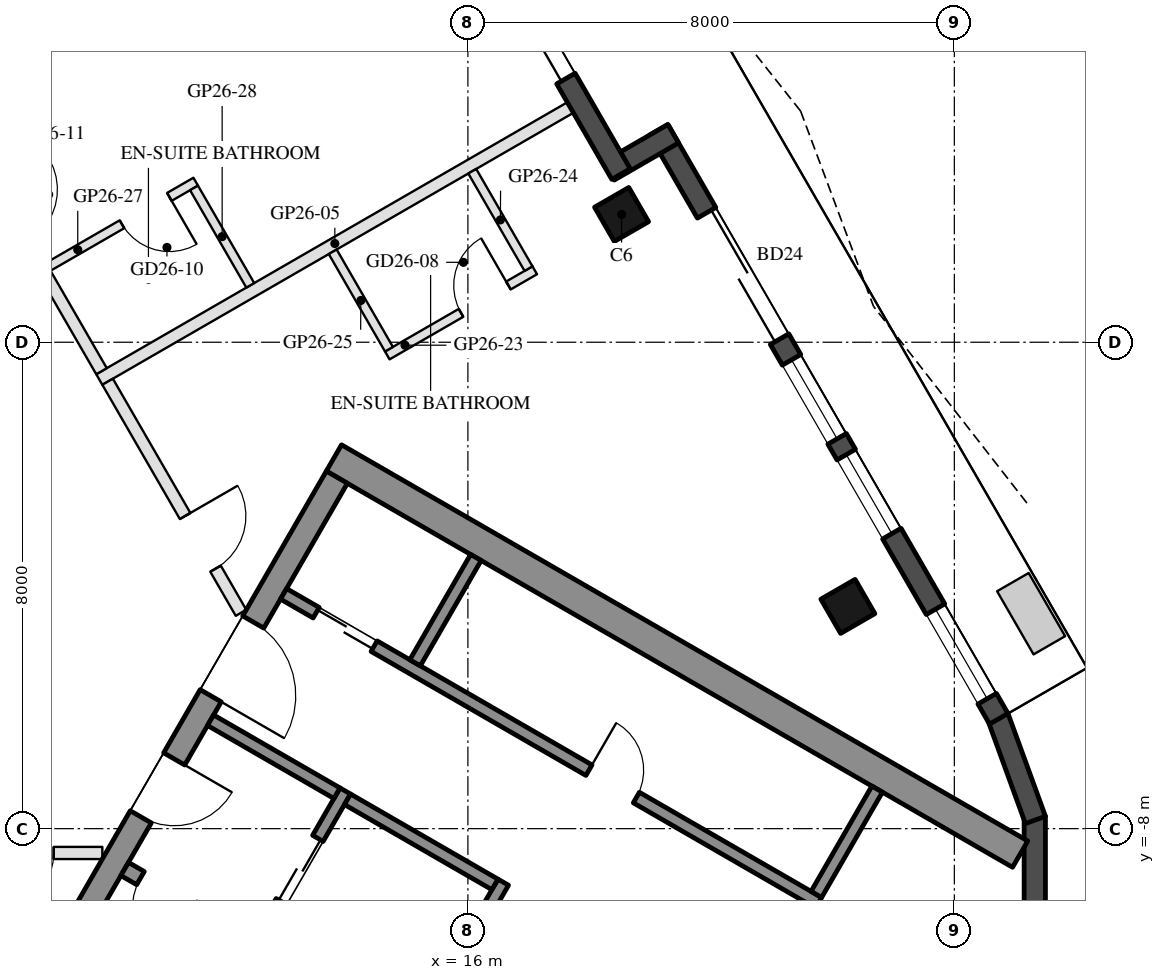
"""IFC4 building model, lengths in metres.
Left out: names, types, materials, properties, quantities, classifications, styles, units other than length and angle.
Written with IfcOpenShell. Run it as: python <this file> out.ifc"""

import sys

from ifc_helpers import new_model, si_unit, direction, frame, frame_2d, origin, origin_2d, place, context, subcontext, project, spatial, rectangle, hollow_rectangle, extrude, boolean, halfspace, element, fill, save


model = new_model("IFC4")
c1 = context("Model", 3, precision=1e-05, world=origin(), true_north=direction((0.0, 1.0)))
c2 = subcontext(c1, "Body", "Model", "MODEL_VIEW")
j1 = project(units=[si_unit("LENGTHUNIT", "METRE"), si_unit("PLANEANGLEUNIT", "RADIAN")], contexts=[c1])
p1 = place(None, origin())
s1 = spatial("IfcSite", under=j1, at=p1, CompositionType="ELEMENT")
p2 = place(p1, origin())
s2 = spatial("IfcBuilding", under=s1, at=p2, CompositionType="ELEMENT")
p3 = place(p2, frame((0.0, 0.0, 268.9)))
s3 = spatial("IfcBuildingStorey", under=s2, at=p3, CompositionType="ELEMENT", Elevation=268.9)
p4 = place(p3, frame((22.249, -4.345, 0.0), z_axis=(0.0, 0.0, 1.0), x_axis=(-0.5, 0.866025403784, 0.0)))
e1 = element("IfcColumn", 1, at=p4, inside=s3, PredefinedType="COLUMN", context=c2, shape_type="SweptSolid", body=[
    boolean("DIFFERENCE", extrude(hollow_rectangle(XDim=0.65, YDim=0.65, WallThickness=0.03, at=origin_2d()), origin(), (0.0, 0.0, 1.0), 3.7), halfspace(frame((0.0, 0.0, 0.047), z_axis=(0.0, 0.0, 1.0), x_axis=(1.0, 0.0, 0.0)), True)),
])
p5 = place(p3, frame((18.527, 2.102, 0.0), z_axis=(0.0, 0.0, 1.0), x_axis=(-0.5, 0.866025403784, 0.0)))
e2 = element("IfcColumn", 2, at=p5, inside=s3, PredefinedType="COLUMN", context=c2, shape_type="SweptSolid", body=[
    boolean("DIFFERENCE", extrude(hollow_rectangle(XDim=0.65, YDim=0.65, WallThickness=0.03, at=origin_2d()), origin(), (0.0, 0.0, 1.0), 3.7), halfspace(frame((0.0, 0.0, 0.04), z_axis=(0.0, 0.0, 1.0), x_axis=(1.0, 0.0, 0.0)), True)),
])
p6 = place(p3, frame((25.323, -9.597, 0.0), z_axis=(0.0, 0.0, 1.0), x_axis=(0.0, 1.0, 0.0)))
e3 = element("IfcWall", 3, at=p6, inside=s3, PredefinedType="SOLIDWALL", context=c2, shape_type="SweptSolid", body=[
    extrude(rectangle(XDim=1.8, YDim=0.35, at=frame_2d((0.9, 0.0))), origin(), (0.0, 0.0, 1.0), 3.55),
])
p7 = place(p3, frame((25.333, -7.857, 0.0), z_axis=(0.0, 0.0, 1.0), x_axis=(-0.34206975284, 0.939674562916, 0.0)))
e4 = element("IfcWall", 4, at=p7, inside=s3, PredefinedType="SOLIDWALL", context=c2, shape_type="SweptSolid", body=[
    extrude(rectangle(XDim=1.8, YDim=0.35, at=frame_2d((0.9, 0.0))), origin(), (0.0, 0.0, 1.0), 3.55),
])
p8 = place(p3, frame((24.731, -6.193, 0.0), z_axis=(0.0, 0.0, 1.0), x_axis=(-0.500007749075, 0.866020929808, 0.0)))
e5 = element("IfcWall", 5, at=p8, inside=s3, PredefinedType="SOLIDWALL", context=c2, shape_type="SweptSolid", body=[
    extrude(rectangle(XDim=11.185, YDim=0.35, at=frame_2d((5.593, 0.0))), origin(), (0.0, 0.0, 1.0), 3.55),
])
p9 = place(p8, frame((0.381, 0.0, 0.3)))
e6 = element("IfcOpeningElement", 6, at=p9, cuts=e5, PredefinedType="OPENING", context=c2, shape_type="SweptSolid", body=[
    extrude(rectangle(XDim=1.7, YDim=2.65, at=frame_2d((0.85, 1.325))), frame((0.0, 0.185, 0.0), z_axis=(0.0, -1.0, 0.0), x_axis=(1.0, 0.0, 0.0)), (0.0, 0.0, 1.0), 0.37),
])
p10 = place(p8, frame((7.21, 0.0, 0.0)))
e7 = element("IfcOpeningElement", 7, at=p10, cuts=e5, PredefinedType="OPENING", context=c2, shape_type="SweptSolid", body=[
    extrude(rectangle(XDim=2.4, YDim=2.4, at=frame_2d((1.2, 1.2))), frame((0.0, 0.185, 0.0), z_axis=(0.0, -1.0, 0.0), x_axis=(1.0, 0.0, 0.0)), (0.0, 0.0, 1.0), 0.37),
])
p11 = place(p8, frame((3.517, 0.0, 0.3)))
e8 = element("IfcOpeningElement", 8, at=p11, cuts=e5, PredefinedType="OPENING", context=c2, shape_type="SweptSolid", body=[
    extrude(rectangle(XDim=1.5, YDim=2.65, at=frame_2d((0.75, 1.325))), frame((0.0, 0.185, 0.0), z_axis=(0.0, -1.0, 0.0), x_axis=(1.0, 0.0, 0.0)), (0.0, 0.0, 1.0), 0.37),
])
p12 = place(p8, frame((5.317, 0.0, 0.3)))
e9 = element("IfcOpeningElement", 9, at=p12, cuts=e5, PredefinedType="OPENING", context=c2, shape_type="SweptSolid", body=[
    extrude(rectangle(XDim=1.5, YDim=2.65, at=frame_2d((0.75, 1.325))), frame((0.0, 0.185, 0.0), z_axis=(0.0, -1.0, 0.0), x_axis=(1.0, 0.0, 0.0)), (0.0, 0.0, 1.0), 0.37),
])
p13 = place(p3, frame((19.377, 3.429, 0.0), z_axis=(0.0, 0.0, 1.0), x_axis=(-0.866092288191, -0.499884134912, 0.0)))
e10 = element("IfcWall", 10, at=p13, inside=s3, PredefinedType="SOLIDWALL", context=c2, shape_type="SweptSolid", body=[
    extrude(rectangle(XDim=1.22, YDim=0.35, at=frame_2d((0.61, 0.0))), origin(), (0.0, 0.0, 1.0), 3.55),
])
p14 = place(p3, frame((18.519, 2.766, 0.0), z_axis=(0.0, 0.0, 1.0), x_axis=(-0.499995993298, 0.866027717042, 0.0)))
e11 = element("IfcWall", 11, at=p14, inside=s3, PredefinedType="SOLIDWALL", context=c2, shape_type="SweptSolid", body=[
    extrude(rectangle(XDim=6.284, YDim=0.35, at=frame_2d((3.142, 0.0))), origin(), (0.0, 0.0, 1.0), 3.55),
])
p15 = place(p14, frame((1.813, 0.0, 0.0)))
e12 = element("IfcOpeningElement", 12, at=p15, cuts=e11, PredefinedType="OPENING", context=c2, shape_type="SweptSolid", body=[
    extrude(rectangle(XDim=2.4, YDim=2.4, at=frame_2d((1.2, 1.2))), frame((0.0, 0.185, 0.0), z_axis=(0.0, -1.0, 0.0), x_axis=(1.0, 0.0, 0.0)), (0.0, 0.0, 1.0), 0.37),
])
p16 = place(p14, frame((4.513, 0.0, 0.3)))
e13 = element("IfcOpeningElement", 13, at=p16, cuts=e11, PredefinedType="OPENING", context=c2, shape_type="SweptSolid", body=[
    extrude(rectangle(XDim=1.4, YDim=2.65, at=frame_2d((0.7, 1.325))), frame((0.0, 0.185, 0.0), z_axis=(0.0, -1.0, 0.0), x_axis=(1.0, 0.0, 0.0)), (0.0, 0.0, 1.0), 0.37),
])
p17 = place(p3, frame((13.797, -1.903, 0.0), z_axis=(0.0, 0.0, 1.0), x_axis=(0.866022106474, -0.500005711065, 0.0)))
e14 = element("IfcWall", 14, at=p17, inside=s3, PredefinedType="SHEAR", context=c2, shape_type="SweptSolid", body=[
    extrude(rectangle(XDim=13.031, YDim=0.5, at=frame_2d((6.516, 0.0))), origin(), (0.0, 0.0, 1.0), 3.5),
])
p18 = place(p3, frame((8.845, -10.88, 0.0), z_axis=(0.0, 0.0, 1.0), x_axis=(0.500004234368, 0.866022959057, 0.0)))
e15 = element("IfcWall", 15, at=p18, inside=s3, PredefinedType="SHEAR", context=c2, shape_type="SweptSolid", body=[
    extrude(rectangle(XDim=10.0, YDim=0.4, at=frame_2d((5.0, 0.0))), origin(), (0.0, 0.0, 1.0), 3.5),
])
p19 = place(p18, frame((3.55, 0.0, 0.0)))
e16 = element("IfcOpeningElement", 16, at=p19, cuts=e15, PredefinedType="OPENING", context=c2, shape_type="SweptSolid", body=[
    extrude(rectangle(XDim=1.1, YDim=2.1, at=frame_2d((0.55, 1.05))), frame((0.0, 0.21, 0.0), z_axis=(0.0, -1.0, 0.0), x_axis=(1.0, 0.0, 0.0)), (0.0, 0.0, 1.0), 0.42),
])
p20 = place(p18, frame((5.85, 0.0, 0.0)))
e17 = element("IfcOpeningElement", 17, at=p20, cuts=e15, PredefinedType="OPENING", context=c2, shape_type="SweptSolid", body=[
    extrude(rectangle(XDim=1.4, YDim=2.1, at=frame_2d((0.7, 1.05))), frame((0.0, 0.21, 0.0), z_axis=(0.0, -1.0, 0.0), x_axis=(1.0, 0.0, 0.0)), (0.0, 0.0, 1.0), 0.42),
])
p21 = place(p3, frame((10.356, -8.664, 0.0), z_axis=(0.0, 0.0, 1.0), x_axis=(0.866028629588, -0.499994412703, 0.0)))
e18 = element("IfcWall", 18, at=p21, inside=s3, PredefinedType="SHEAR", context=c2, shape_type="SweptSolid", body=[
    extrude(rectangle(XDim=6.45, YDim=0.25, at=frame_2d((3.225, 0.0))), origin(), (0.0, 0.0, 1.0), 3.5),
])
p22 = place(p21, frame((0.3, 0.0, 0.0)))
e19 = element("IfcOpeningElement", 19, at=p22, cuts=e18, PredefinedType="OPENING", context=c2, shape_type="SweptSolid", body=[
    extrude(rectangle(XDim=1.0, YDim=2.1, at=frame_2d((0.5, 1.05))), frame((0.0, 0.135, 0.0), z_axis=(0.0, -1.0, 0.0), x_axis=(1.0, 0.0, 0.0)), (0.0, 0.0, 1.0), 0.27),
])
p23 = place(p3, frame((15.181, -11.305, 0.0), z_axis=(0.0, 0.0, 1.0), x_axis=(0.49994636267, 0.866056369097, 0.0)))
e20 = element("IfcWall", 20, at=p23, inside=s3, PredefinedType="SHEAR", context=c2, shape_type="SweptSolid", body=[
    extrude(rectangle(XDim=2.8, YDim=0.2, at=frame_2d((1.4, 0.0))), origin(), (0.0, 0.0, 1.0), 3.5),
])
p24 = place(p3, frame((12.583, -9.805, 0.0), z_axis=(0.0, 0.0, 1.0), x_axis=(0.49994636267, 0.866056369097, 0.0)))
e21 = element("IfcWall", 21, at=p24, inside=s3, PredefinedType="SHEAR", context=c2, shape_type="SweptSolid", body=[
    extrude(rectangle(XDim=2.8, YDim=0.2, at=frame_2d((1.4, 0.0))), origin(), (0.0, 0.0, 1.0), 3.5),
])
p25 = place(p24, frame((0.7, 0.0, 0.0)))
e22 = element("IfcOpeningElement", 22, at=p25, cuts=e21, PredefinedType="OPENING", context=c2, shape_type="SweptSolid", body=[
    extrude(rectangle(XDim=1.2, YDim=2.1, at=frame_2d((0.6, 1.05))), frame((0.0, 0.11, 0.0), z_axis=(0.0, -1.0, 0.0), x_axis=(1.0, 0.0, 0.0)), (0.0, 0.0, 1.0), 0.22),
])
p26 = place(p3, frame((11.768, -6.217, 0.0), z_axis=(0.0, 0.0, 1.0), x_axis=(0.866050077142, -0.499957262057, 0.0)))
e23 = element("IfcWall", 23, at=p26, inside=s3, PredefinedType="SHEAR", context=c2, shape_type="SweptSolid", body=[
    extrude(rectangle(XDim=2.4, YDim=0.2, at=frame_2d((1.2, 0.0))), origin(), (0.0, 0.0, 1.0), 3.5),
])
p27 = place(p3, frame((14.02, -7.517, 0.0), z_axis=(0.0, 0.0, 1.0), x_axis=(0.866034573852, -0.49998411664, 0.0)))
e24 = element("IfcWall", 24, at=p27, inside=s3, PredefinedType="SHEAR", context=c2, shape_type="SweptSolid", body=[
    extrude(rectangle(XDim=2.8, YDim=0.2, at=frame_2d((1.4, 0.0))), origin(), (0.0, 0.0, 1.0), 3.5),
])
p28 = place(p3, frame((12.968, -4.138, 0.0), z_axis=(0.0, 0.0, 1.0), x_axis=(0.866028328073, -0.49999493495, 0.0)))
e25 = element("IfcWall", 25, at=p28, inside=s3, PredefinedType="SHEAR", context=c2, shape_type="SweptSolid", body=[
    extrude(rectangle(XDim=10.16, YDim=0.2, at=frame_2d((5.08, 0.0))), origin(), (0.0, 0.0, 1.0), 3.5),
])
p29 = place(p28, frame((0.62, 0.0, 0.0)))
e26 = element("IfcOpeningElement", 26, at=p29, cuts=e25, PredefinedType="OPENING", context=c2, shape_type="SweptSolid", body=[
    extrude(rectangle(XDim=1.1, YDim=2.1, at=frame_2d((0.55, 1.05))), frame((0.0, 0.11, 0.0), z_axis=(0.0, -1.0, 0.0), x_axis=(1.0, 0.0, 0.0)), (0.0, 0.0, 1.0), 0.22),
])
p30 = place(p28, frame((5.8, 0.0, 0.0)))
e27 = element("IfcOpeningElement", 27, at=p30, cuts=e25, PredefinedType="OPENING", context=c2, shape_type="SweptSolid", body=[
    extrude(rectangle(XDim=0.9, YDim=2.1, at=frame_2d((0.45, 1.05))), frame((0.0, 0.11, 0.0), z_axis=(0.0, -1.0, 0.0), x_axis=(1.0, 0.0, 0.0)), (0.0, 0.0, 1.0), 0.22),
])
for number, where, z_axis, x_axis in (
    (28, (15.131, -5.272, 0.0), (0.0, 0.0, 1.0), (0.5, 0.866, 0.0)),
    (29, (21.73, -9.082, 0.0), (0.0, 0.0, 1.0), (0.5, 0.866, 0.0)),
):
    element("IfcWall", number, at=place(p3, frame(where, z_axis=z_axis, x_axis=x_axis)), inside=s3, PredefinedType="SHEAR", context=c2, shape_type="SweptSolid", body=[
        extrude(rectangle(XDim=2.0, YDim=0.2, at=frame_2d((1.0, 0.0))), origin(), (0.0, 0.0, 1.0), 3.5),
    ])
p31 = place(p3, frame((17.685, 3.86, 0.0), z_axis=(0.0, 0.0, 1.0), x_axis=(-0.866026066645, -0.499998851889, 0.0)))
e30 = element("IfcWall", 30, at=p31, inside=s3, PredefinedType="PARTITIONING", context=c2, shape_type="SweptSolid", body=[
    extrude(rectangle(XDim=8.946, YDim=0.2, at=frame_2d((4.473, 0.0))), origin(), (0.0, 0.0, 1.0), 3.16),
])
p32 = place(p3, frame((9.988, -8.4, 0.0), z_axis=(0.0, 0.0, 1.0), x_axis=(-1.0, 0.0, 0.0)))
e31 = element("IfcWall", 31, at=p32, inside=s3, PredefinedType="PARTITIONING", context=c2, shape_type="SweptSolid", body=[
    extrude(rectangle(XDim=3.788, YDim=0.2, at=frame_2d((1.894, 0.0))), origin(), (0.0, 0.0, 1.0), 3.0),
])
p33 = place(p32, frame((0.8, 0.0, 0.0)))
e32 = element("IfcOpeningElement", 32, at=p33, cuts=e31, PredefinedType="OPENING", context=c2, shape_type="SweptSolid", body=[
    extrude(rectangle(XDim=1.0, YDim=2.1, at=frame_2d((0.5, 1.05))), frame((0.0, 0.11, 0.0), z_axis=(0.0, -1.0, 0.0), x_axis=(1.0, 0.0, 0.0)), (0.0, 0.0, 1.0), 0.22),
])
p34 = place(p3, frame((10.075, -0.65, 0.0), z_axis=(0.0, 0.0, 1.0), x_axis=(0.499998569178, -0.866026229868, 0.0)))
e33 = element("IfcWall", 33, at=p34, inside=s3, PredefinedType="PARTITIONING", context=c2, shape_type="SweptSolid", body=[
    extrude(rectangle(XDim=4.388, YDim=0.2, at=frame_2d((2.194, 0.0))), origin(), (0.0, 0.0, 1.0), 3.0),
])
p35 = place(p34, frame((2.55, 0.0, 0.0)))
e34 = element("IfcOpeningElement", 34, at=p35, cuts=e33, PredefinedType="OPENING", context=c2, shape_type="SweptSolid", body=[
    extrude(rectangle(XDim=1.0, YDim=2.1, at=frame_2d((0.5, 1.05))), frame((0.0, 0.11, 0.0), z_axis=(0.0, -1.0, 0.0), x_axis=(1.0, 0.0, 0.0)), (0.0, 0.0, 1.0), 0.22),
])
p36 = place(p3, frame((14.674, -0.217, 0.0), z_axis=(0.0, 0.0, 1.0), x_axis=(0.866056369097, 0.49994636267, 0.0)))
e35 = element("IfcWall", 35, at=p36, inside=s3, PredefinedType="PARTITIONING", context=c2, shape_type="SweptSolid", body=[
    extrude(rectangle(XDim=2.8, YDim=0.15, at=frame_2d((1.4, 0.0))), origin(), (0.0, 0.0, 1.0), 3.0),
])
p37 = place(p36, frame((1.4, 0.0, 0.0)))
e36 = element("IfcOpeningElement", 36, at=p37, cuts=e35, PredefinedType="OPENING", context=c2, shape_type="SweptSolid", body=[
    extrude(rectangle(XDim=0.9, YDim=2.1, at=frame_2d((0.45, 1.05))), frame((0.0, 0.085, 0.0), z_axis=(0.0, -1.0, 0.0), x_axis=(1.0, 0.0, 0.0)), (0.0, 0.0, 1.0), 0.17),
])
p38 = place(p3, frame((16.997, 1.211, 0.0), z_axis=(0.0, 0.0, 1.0), x_axis=(-0.500042316284, 0.866000971088, 0.0)))
e37 = element("IfcWall", 37, at=p38, inside=s3, PredefinedType="PARTITIONING", context=c2, shape_type="SweptSolid", body=[
    extrude(rectangle(XDim=1.85, YDim=0.15, at=frame_2d((0.925, 0.0))), origin(), (0.0, 0.0, 1.0), 3.0),
])
p39 = place(p3, frame((14.702, -0.115, 0.0), z_axis=(0.0, 0.0, 1.0), x_axis=(-0.499985172903, 0.866033964044, 0.0)))
e38 = element("IfcWall", 38, at=p39, inside=s3, PredefinedType="PARTITIONING", context=c2, shape_type="SweptSolid", body=[
    extrude(rectangle(XDim=1.85, YDim=0.15, at=frame_2d((0.925, 0.0))), origin(), (0.0, 0.0, 1.0), 3.0),
])
p40 = place(p3, frame((6.476, 5.583, 0.0), z_axis=(0.0, 0.0, 1.0), x_axis=(0.499989243959, -0.866031613699, 0.0)))
e39 = element("IfcWall", 39, at=p40, inside=s3, PredefinedType="PARTITIONING", context=c2, shape_type="SweptSolid", body=[
    extrude(rectangle(XDim=6.997, YDim=0.2, at=frame_2d((3.499, 0.0))), origin(), (0.0, 0.0, 1.0), 3.0),
])
p41 = place(p40, frame((3.547, 0.0, 0.0)))
e40 = element("IfcOpeningElement", 40, at=p41, cuts=e39, PredefinedType="OPENING", context=c2, shape_type="SweptSolid", body=[
    extrude(rectangle(XDim=1.0, YDim=2.1, at=frame_2d((0.5, 1.05))), frame((0.0, 0.11, 0.0), z_axis=(0.0, -1.0, 0.0), x_axis=(1.0, 0.0, 0.0)), (0.0, 0.0, 1.0), 0.22),
])
p42 = place(p3, frame((11.524, 2.641, 0.0), z_axis=(0.0, 0.0, 1.0), x_axis=(-0.866018616679, -0.500011755427, 0.0)))
e41 = element("IfcWall", 41, at=p42, inside=s3, PredefinedType="PARTITIONING", context=c2, shape_type="SweptSolid", body=[
    extrude(rectangle(XDim=2.8, YDim=0.15, at=frame_2d((1.4, 0.0))), origin(), (0.0, 0.0, 1.0), 3.55),
])
p43 = place(p42, frame((0.5, 0.0, 0.0)))
e42 = element("IfcOpeningElement", 42, at=p43, cuts=e41, PredefinedType="OPENING", context=c2, shape_type="SweptSolid", body=[
    extrude(rectangle(XDim=0.9, YDim=2.1, at=frame_2d((0.45, 1.05))), frame((0.0, 0.085, 0.0), z_axis=(0.0, -1.0, 0.0), x_axis=(1.0, 0.0, 0.0)), (0.0, 0.0, 1.0), 0.17),
])
p44 = place(p3, frame((12.421, 0.936, 0.0), z_axis=(0.0, 0.0, 1.0), x_axis=(-0.500042316284, 0.866000971088, 0.0)))
e43 = element("IfcWall", 43, at=p44, inside=s3, PredefinedType="PARTITIONING", context=c2, shape_type="SweptSolid", body=[
    extrude(rectangle(XDim=1.85, YDim=0.15, at=frame_2d((0.925, 0.0))), origin(), (0.0, 0.0, 1.0), 3.0),
])
p45 = place(p9, origin())
e44 = element("IfcWindow", 44, at=p45, inside=s3, PartitioningType="SINGLE_PANEL", PredefinedType="WINDOW", context=c2, shape_type="SweptSolid", body=[
    extrude(rectangle(XDim=1.7, YDim=2.65, at=frame_2d((0.85, 1.325))), frame((0.0, 0.03, 0.0), z_axis=(0.0, -1.0, 0.0), x_axis=(1.0, 0.0, 0.0)), (0.0, 0.0, 1.0), 0.06),
])
fill(e6, e44)
p46 = place(p10, frame((2.4, 0.0, 0.0), z_axis=(0.0, 0.0, 1.0), x_axis=(-1.0, 0.0, 0.0)))
e45 = element("IfcDoor", 45, at=p46, inside=s3, OperationType="SLIDING_TO_LEFT", PredefinedType="DOOR", context=c2, shape_type="SweptSolid", body=[
    extrude(rectangle(XDim=2.4, YDim=2.4, at=frame_2d((1.2, 1.2))), frame((0.0, 0.025, 0.0), z_axis=(0.0, -1.0, 0.0), x_axis=(1.0, 0.0, 0.0)), (0.0, 0.0, 1.0), 0.05),
])
fill(e7, e45)
p47 = place(p11, origin())
e46 = element("IfcWindow", 46, at=p47, inside=s3, PartitioningType="SINGLE_PANEL", PredefinedType="WINDOW", context=c2, shape_type="SweptSolid", body=[
    extrude(rectangle(XDim=1.5, YDim=2.65, at=frame_2d((0.75, 1.325))), frame((0.0, 0.03, 0.0), z_axis=(0.0, -1.0, 0.0), x_axis=(1.0, 0.0, 0.0)), (0.0, 0.0, 1.0), 0.06),
])
fill(e8, e46)
p48 = place(p12, origin())
e47 = element("IfcWindow", 47, at=p48, inside=s3, PartitioningType="SINGLE_PANEL", PredefinedType="WINDOW", context=c2, shape_type="SweptSolid", body=[
    extrude(rectangle(XDim=1.5, YDim=2.65, at=frame_2d((0.75, 1.325))), frame((0.0, 0.03, 0.0), z_axis=(0.0, -1.0, 0.0), x_axis=(1.0, 0.0, 0.0)), (0.0, 0.0, 1.0), 0.06),
])
fill(e9, e47)
p49 = place(p15, frame((2.4, 0.0, 0.0), z_axis=(0.0, 0.0, 1.0), x_axis=(-1.0, 0.0, 0.0)))
e48 = element("IfcDoor", 48, at=p49, inside=s3, OperationType="SLIDING_TO_LEFT", PredefinedType="DOOR", context=c2, shape_type="SweptSolid", body=[
    extrude(rectangle(XDim=2.4, YDim=2.4, at=frame_2d((1.2, 1.2))), frame((0.0, 0.025, 0.0), z_axis=(0.0, -1.0, 0.0), x_axis=(1.0, 0.0, 0.0)), (0.0, 0.0, 1.0), 0.05),
])
fill(e12, e48)
p50 = place(p25, origin())
e49 = element("IfcDoor", 49, at=p50, inside=s3, OperationType="DOUBLE_DOOR_SLIDING", PredefinedType="DOOR", context=c2, shape_type="SweptSolid", body=[
    extrude(rectangle(XDim=1.2, YDim=2.1, at=frame_2d((0.6, 1.05))), frame((0.0, 0.025, 0.0), z_axis=(0.0, -1.0, 0.0), x_axis=(1.0, 0.0, 0.0)), (0.0, 0.0, 1.0), 0.05),
])
fill(e22, e49)
p51 = place(p29, origin())
e50 = element("IfcDoor", 50, at=p51, inside=s3, OperationType="DOUBLE_DOOR_SLIDING", PredefinedType="DOOR", context=c2, shape_type="SweptSolid", body=[
    extrude(rectangle(XDim=1.1, YDim=2.1, at=frame_2d((0.55, 1.05))), frame((0.0, 0.025, 0.0), z_axis=(0.0, -1.0, 0.0), x_axis=(1.0, 0.0, 0.0)), (0.0, 0.0, 1.0), 0.05),
])
fill(e26, e50)
p52 = place(p30, origin())
e51 = element("IfcDoor", 51, at=p52, inside=s3, OperationType="SINGLE_SWING_LEFT", PredefinedType="DOOR", context=c2, shape_type="SweptSolid", body=[
    extrude(rectangle(XDim=0.9, YDim=2.1, at=frame_2d((0.45, 1.05))), frame((0.0, 0.025, 0.0), z_axis=(0.0, -1.0, 0.0), x_axis=(1.0, 0.0, 0.0)), (0.0, 0.0, 1.0), 0.05),
])
fill(e27, e51)
p53 = place(p19, frame((1.1, 0.0, 0.0), z_axis=(0.0, 0.0, 1.0), x_axis=(-1.0, 0.0, 0.0)))
e52 = element("IfcDoor", 52, at=p53, inside=s3, OperationType="SINGLE_SWING_LEFT", PredefinedType="DOOR", context=c2, shape_type="SweptSolid", body=[
    extrude(rectangle(XDim=1.1, YDim=2.1, at=frame_2d((0.55, 1.05))), frame((0.0, 0.025, 0.0), z_axis=(0.0, -1.0, 0.0), x_axis=(1.0, 0.0, 0.0)), (0.0, 0.0, 1.0), 0.05),
])
fill(e16, e52)
p54 = place(p20, frame((1.4, 0.0, 0.0), z_axis=(0.0, 0.0, 1.0), x_axis=(-1.0, 0.0, 0.0)))
e53 = element("IfcDoor", 53, at=p54, inside=s3, OperationType="DOUBLE_DOOR_SINGLE_SWING", PredefinedType="DOOR", context=c2, shape_type="SweptSolid", body=[
    extrude(rectangle(XDim=1.4, YDim=2.1, at=frame_2d((0.7, 1.05))), frame((0.0, 0.025, 0.0), z_axis=(0.0, -1.0, 0.0), x_axis=(1.0, 0.0, 0.0)), (0.0, 0.0, 1.0), 0.05),
])
fill(e17, e53)
p55 = place(p22, frame((1.0, 0.0, 0.0), z_axis=(0.0, 0.0, 1.0), x_axis=(-1.0, 0.0, 0.0)))
e54 = element("IfcDoor", 54, at=p55, inside=s3, OperationType="SINGLE_SWING_LEFT", PredefinedType="DOOR", context=c2, shape_type="SweptSolid", body=[
    extrude(rectangle(XDim=1.0, YDim=2.1, at=frame_2d((0.5, 1.05))), frame((0.0, 0.025, 0.0), z_axis=(0.0, -1.0, 0.0), x_axis=(1.0, 0.0, 0.0)), (0.0, 0.0, 1.0), 0.05),
])
fill(e19, e54)
p56 = place(p33, origin())
e55 = element("IfcDoor", 55, at=p56, inside=s3, OperationType="SINGLE_SWING_RIGHT", PredefinedType="DOOR", context=c2, shape_type="SweptSolid", body=[
    extrude(rectangle(XDim=1.0, YDim=2.1, at=frame_2d((0.5, 1.05))), frame((0.0, 0.025, 0.0), z_axis=(0.0, -1.0, 0.0), x_axis=(1.0, 0.0, 0.0)), (0.0, 0.0, 1.0), 0.05),
])
fill(e32, e55)
p57 = place(p37, origin())
e56 = element("IfcDoor", 56, at=p57, inside=s3, OperationType="SINGLE_SWING_RIGHT", PredefinedType="DOOR", context=c2, shape_type="SweptSolid", body=[
    extrude(rectangle(XDim=0.9, YDim=2.1, at=frame_2d((0.45, 1.05))), frame((0.0, 0.025, 0.0), z_axis=(0.0, -1.0, 0.0), x_axis=(1.0, 0.0, 0.0)), (0.0, 0.0, 1.0), 0.05),
])
fill(e36, e56)
p58 = place(p35, origin())
e57 = element("IfcDoor", 57, at=p58, inside=s3, OperationType="SINGLE_SWING_LEFT", PredefinedType="DOOR", context=c2, shape_type="SweptSolid", body=[
    extrude(rectangle(XDim=1.0, YDim=2.1, at=frame_2d((0.5, 1.05))), frame((0.0, 0.025, 0.0), z_axis=(0.0, -1.0, 0.0), x_axis=(1.0, 0.0, 0.0)), (0.0, 0.0, 1.0), 0.05),
])
fill(e34, e57)
p59 = place(p43, origin())
e58 = element("IfcDoor", 58, at=p59, inside=s3, OperationType="SINGLE_SWING_LEFT", PredefinedType="DOOR", context=c2, shape_type="SweptSolid", body=[
    extrude(rectangle(XDim=0.9, YDim=2.1, at=frame_2d((0.45, 1.05))), frame((0.0, 0.025, 0.0), z_axis=(0.0, -1.0, 0.0), x_axis=(1.0, 0.0, 0.0)), (0.0, 0.0, 1.0), 0.05),
])
fill(e42, e58)
save(model, sys.argv[1])
